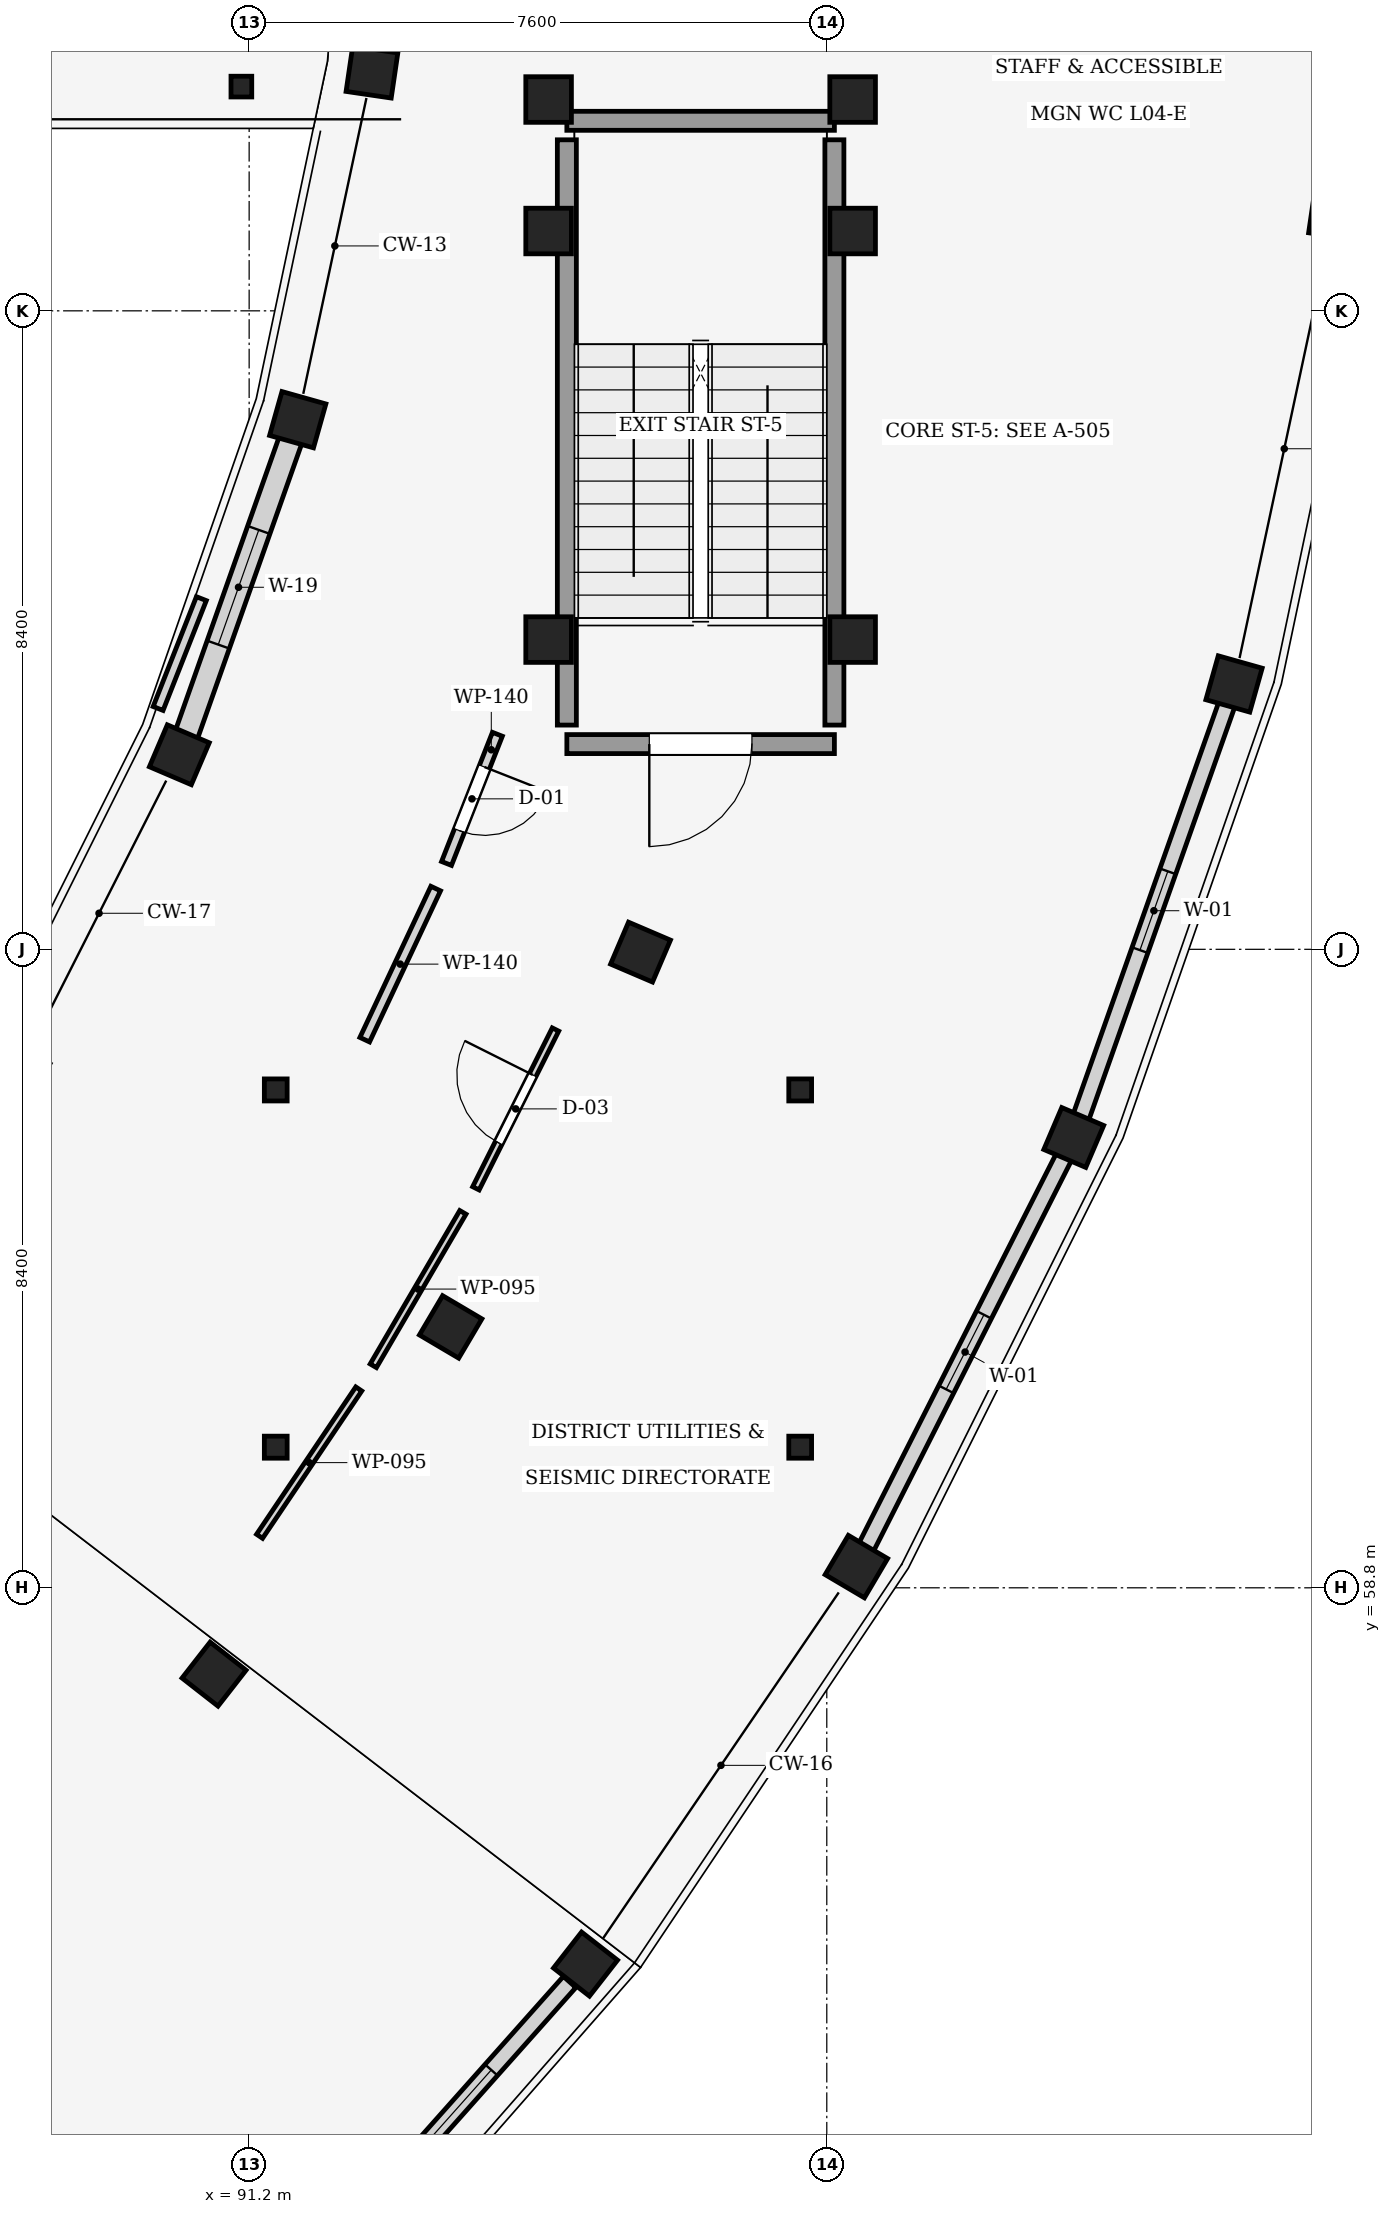
"""IFC4 building model, lengths in metres.
Left out: names, types, materials, properties, quantities, classifications, styles, units other than length and angle.
Written with IfcOpenShell. Run it as: python <this file> out.ifc"""

import sys

from ifc_helpers import new_model, si_unit, direction, frame, frame_2d, origin, origin_2d, place, context, subcontext, project, spatial, rectangle, hollow_circle, i_section, extrude, element, fill, save


model = new_model("IFC4")
c1 = context("Model", 3, precision=1e-05, world=origin(), true_north=direction((0.0, 1.0)))
c2 = subcontext(c1, "Body", "Model", "MODEL_VIEW")
j1 = project(units=[si_unit("LENGTHUNIT", "METRE"), si_unit("PLANEANGLEUNIT", "RADIAN")], contexts=[c1])
p1 = place(None, origin())
s1 = spatial("IfcSite", under=j1, at=p1, CompositionType="ELEMENT")
p2 = place(p1, origin())
s2 = spatial("IfcBuilding", under=s1, at=p2, CompositionType="ELEMENT")
p3 = place(p2, frame((0.0, 0.0, 17.25)))
s3 = spatial("IfcBuildingStorey", under=s2, at=p3, CompositionType="ELEMENT", Elevation=17.25)
for number, where, z_axis, x_axis in (
    (1, (90.738, 57.664, 0.0), (0.0, 0.0, 1.0), (0.788, -0.615, 0.0)),
    (2, (95.626, 53.849, 0.0), (0.0, 0.0, 1.0), (0.788, -0.615, 0.0)),
    (3, (93.851, 62.232, 0.0), (0.0, 0.0, 1.0), (0.861, -0.509, 0.0)),
    (4, (99.189, 59.079, 0.0), (0.0, 0.0, 1.0), (0.861, -0.509, 0.0)),
    (5, (90.281, 69.76, 0.0), (0.0, 0.0, 1.0), (0.919, -0.393, 0.0)),
    (6, (96.349, 67.163, 0.0), (0.0, 0.0, 1.0), (0.919, -0.393, 0.0)),
    (7, (102.049, 64.724, 0.0), (0.0, 0.0, 1.0), (0.919, -0.393, 0.0)),
    (8, (91.839, 74.168, 0.0), (0.0, 0.0, 1.0), (0.962, -0.272, 0.0)),
    (9, (104.158, 70.691, 0.0), (0.0, 0.0, 1.0), (0.962, -0.272, 0.0)),
    (10, (92.816, 78.74, 0.0), (0.0, 0.0, 1.0), (0.989, -0.145, 0.0)),
    (11, (105.48, 76.88, 0.0), (0.0, 0.0, 1.0), (0.989, -0.145, 0.0)),
):
    element("IfcColumn", number, at=place(p3, frame(where, z_axis=z_axis, x_axis=x_axis)), inside=s3, PredefinedType="COLUMN", context=c2, shape_type="SweptSolid", body=[
        extrude(rectangle(XDim=0.6, YDim=0.6, at=origin_2d()), origin(), (0.0, 0.0, 1.0), 4.05),
    ])
p4 = place(p3, frame((91.098, 78.55, 0.0), z_axis=(0.0, 0.0, 1.0), x_axis=(1.0, 0.0, 0.0)))
e12 = element("IfcColumn", 12, at=p4, inside=s3, PredefinedType="COLUMN", context=c2, shape_type="SweptSolid", body=[
    extrude(hollow_circle(Radius=0.136, WallThickness=0.016, at=origin_2d()), origin(), (0.0, 0.0, 1.0), 3.82),
])
for number, where, z_axis, x_axis in (
    (13, (99.14, 71.275, 0.0), (0.0, 0.0, 1.0), (1.0, 0.0, 0.0)),
    (14, (95.14, 71.275, 0.0), (0.0, 0.0, 1.0), (1.0, 0.0, 0.0)),
    (15, (99.14, 76.65, 0.0), (0.0, 0.0, 1.0), (1.0, 0.0, 0.0)),
    (16, (95.14, 76.65, 0.0), (0.0, 0.0, 1.0), (1.0, 0.0, 0.0)),
    (17, (99.14, 78.38, 0.0), (0.0, 0.0, 1.0), (1.0, 0.0, 0.0)),
    (18, (95.14, 78.38, 0.0), (0.0, 0.0, 1.0), (1.0, 0.0, 0.0)),
):
    element("IfcColumn", number, at=place(p3, frame(where, z_axis=z_axis, x_axis=x_axis)), inside=s3, PredefinedType="COLUMN", context=c2, shape_type="SweptSolid", body=[
        extrude(rectangle(XDim=0.6, YDim=0.6, at=origin_2d()), origin(), (0.0, 0.0, 1.0), 4.05),
    ])
for number, where, z_axis, x_axis in (
    (19, (91.55, 60.65, 0.0), (0.0, 0.0, 1.0), (1.0, 0.0, 0.0)),
    (20, (98.45, 60.65, 0.0), (0.0, 0.0, 1.0), (1.0, 0.0, 0.0)),
    (21, (98.45, 65.35, 0.0), (0.0, 0.0, 1.0), (1.0, 0.0, 0.0)),
    (22, (91.55, 65.35, 0.0), (0.0, 0.0, 1.0), (1.0, 0.0, 0.0)),
):
    element("IfcColumn", number, at=place(p3, frame(where, z_axis=z_axis, x_axis=x_axis)), inside=s3, PredefinedType="COLUMN", context=c2, shape_type="SweptSolid", body=[
        extrude(i_section(OverallWidth=0.3, OverallDepth=0.29, WebThickness=0.009, FlangeThickness=0.014, at=origin_2d()), origin(), (0.0, 0.0, 1.0), 4.05),
    ])
p5 = place(p3, frame((95.417, 53.615, 0.0), z_axis=(0.0, 0.0, 1.0), x_axis=(-0.6649220167, -0.746912787217, 0.0)))
e23 = element("IfcWall", 23, at=p5, inside=s3, PredefinedType="STANDARD", context=c2, shape_type="SweptSolid", body=[
    extrude(rectangle(XDim=5.699, YDim=0.22, at=frame_2d((2.85, 0.0))), origin(), (0.0, 0.0, 1.0), 2.935),
])
p6 = place(p5, frame((1.55, 0.0, 0.85)))
e24 = element("IfcOpeningElement", 24, at=p6, cuts=e23, PredefinedType="OPENING", context=c2, shape_type="SweptSolid", body=[
    extrude(rectangle(XDim=2.6, YDim=1.85, at=frame_2d((1.3, 0.925))), frame((0.0, 0.12, 0.0), z_axis=(0.0, -1.0, 0.0), x_axis=(1.0, 0.0, 0.0)), (0.0, 0.0, 1.0), 0.24),
])
p7 = place(p3, frame((101.93, 64.49, 0.0), z_axis=(0.0, 0.0, 1.0), x_axis=(-0.451920591159, -0.892058170349, 0.0)))
e25 = element("IfcWall", 25, at=p7, inside=s3, PredefinedType="STANDARD", context=c2, shape_type="SweptSolid", body=[
    extrude(rectangle(XDim=5.802, YDim=0.22, at=frame_2d((2.901, 0.0))), origin(), (0.0, 0.0, 1.0), 2.935),
])
p8 = place(p7, frame((2.351, 0.0, 0.85)))
e26 = element("IfcOpeningElement", 26, at=p8, cuts=e25, PredefinedType="OPENING", context=c2, shape_type="SweptSolid", body=[
    extrude(rectangle(XDim=1.1, YDim=1.35, at=frame_2d((0.55, 0.675))), frame((0.0, 0.12, 0.0), z_axis=(0.0, -1.0, 0.0), x_axis=(1.0, 0.0, 0.0)), (0.0, 0.0, 1.0), 0.24),
])
p9 = place(p3, frame((104.075, 70.456, 0.0), z_axis=(0.0, 0.0, 1.0), x_axis=(-0.333212182882, -0.942851865978, 0.0)))
e27 = element("IfcWall", 27, at=p9, inside=s3, PredefinedType="STANDARD", context=c2, shape_type="SweptSolid", body=[
    extrude(rectangle(XDim=5.83, YDim=0.22, at=frame_2d((2.915, 0.0))), origin(), (0.0, 0.0, 1.0), 2.935),
])
p10 = place(p9, frame((2.365, 0.0, 0.85)))
e28 = element("IfcOpeningElement", 28, at=p10, cuts=e27, PredefinedType="OPENING", context=c2, shape_type="SweptSolid", body=[
    extrude(rectangle(XDim=1.1, YDim=1.35, at=frame_2d((0.55, 0.675))), frame((0.0, 0.12, 0.0), z_axis=(0.0, -1.0, 0.0), x_axis=(1.0, 0.0, 0.0)), (0.0, 0.0, 1.0), 0.24),
])
p11 = place(p3, frame((90.365, 69.995, 0.0), z_axis=(0.0, 0.0, 1.0), x_axis=(0.333168640656, 0.942867253055, 0.0)))
e29 = element("IfcWall", 29, at=p11, inside=s3, PredefinedType="STANDARD", context=c2, shape_type="SweptSolid", body=[
    extrude(rectangle(XDim=4.177, YDim=0.31, at=frame_2d((2.088, 0.0))), origin(), (0.0, 0.0, 1.0), 3.085),
])
p12 = place(p11, frame((1.288, 0.0, 0.85)))
e30 = element("IfcOpeningElement", 30, at=p12, cuts=e29, PredefinedType="OPENING", context=c2, shape_type="SweptSolid", body=[
    extrude(rectangle(XDim=1.6, YDim=1.65, at=frame_2d((0.8, 0.825))), frame((0.0, 0.165, 0.0), z_axis=(0.0, -1.0, 0.0), x_axis=(1.0, 0.0, 0.0)), (0.0, 0.0, 1.0), 0.33),
])
p13 = place(p3, frame((92.835, 78.975, 0.0), z_axis=(0.0, 0.0, 1.0), x_axis=(0.081074723481, 0.99670802606, 0.0)))
e31 = element("IfcWall", 31, at=p13, inside=s3, PredefinedType="STANDARD", context=c2, shape_type="SweptSolid", body=[
    extrude(rectangle(XDim=4.204, YDim=0.31, at=frame_2d((2.102, 0.0))), origin(), (0.0, 0.0, 1.0), 2.935),
])
p14 = place(p13, frame((1.052, 0.0, 0.85)))
e32 = element("IfcOpeningElement", 32, at=p14, cuts=e31, PredefinedType="OPENING", context=c2, shape_type="SweptSolid", body=[
    extrude(rectangle(XDim=2.1, YDim=1.65, at=frame_2d((1.05, 0.825))), frame((0.0, 0.165, 0.0), z_axis=(0.0, -1.0, 0.0), x_axis=(1.0, 0.0, 0.0)), (0.0, 0.0, 1.0), 0.33),
])
p15 = place(p3, frame((98.9, 69.9, 0.0), z_axis=(0.0, 0.0, 1.0), x_axis=(-1.0, 0.0, 0.0)))
e33 = element("IfcWall", 33, at=p15, inside=s3, PredefinedType="SHEAR", context=c2, shape_type="SweptSolid", body=[
    extrude(rectangle(XDim=3.52, YDim=0.25, at=frame_2d((1.76, 0.0))), origin(), (0.0, 0.0, 1.0), 4.05),
])
p16 = place(p15, frame((1.085, 0.0, 0.0)))
e34 = element("IfcOpeningElement", 34, at=p16, cuts=e33, PredefinedType="OPENING", context=c2, shape_type="SweptSolid", body=[
    extrude(rectangle(XDim=1.35, YDim=2.2, at=frame_2d((0.675, 1.1))), frame((0.0, 0.135, 0.0), z_axis=(0.0, -1.0, 0.0), x_axis=(1.0, 0.0, 0.0)), (0.0, 0.0, 1.0), 0.27),
])
p17 = place(p3, frame((95.38, 70.15, 0.0), z_axis=(0.0, 0.0, 1.0), x_axis=(0.0, 1.0, 0.0)))
e35 = element("IfcWall", 35, at=p17, inside=s3, PredefinedType="SHEAR", context=c2, shape_type="SweptSolid", body=[
    extrude(rectangle(XDim=7.7, YDim=0.25, at=frame_2d((3.85, 0.0))), origin(), (0.0, 0.0, 1.0), 4.05),
])
p18 = place(p3, frame((95.38, 78.1, 0.0), z_axis=(0.0, 0.0, 1.0), x_axis=(1.0, 0.0, 0.0)))
e36 = element("IfcWall", 36, at=p18, inside=s3, PredefinedType="SHEAR", context=c2, shape_type="SweptSolid", body=[
    extrude(rectangle(XDim=3.52, YDim=0.25, at=frame_2d((1.76, 0.0))), origin(), (0.0, 0.0, 1.0), 4.05),
])
p19 = place(p3, frame((98.9, 77.85, 0.0), z_axis=(0.0, 0.0, 1.0), x_axis=(0.0, -1.0, 0.0)))
e37 = element("IfcWall", 37, at=p19, inside=s3, PredefinedType="SHEAR", context=c2, shape_type="SweptSolid", body=[
    extrude(rectangle(XDim=7.7, YDim=0.25, at=frame_2d((3.85, 0.0))), origin(), (0.0, 0.0, 1.0), 4.05),
])
p20 = place(p3, frame((92.833, 61.721, 0.0), z_axis=(0.0, 0.0, 1.0), x_axis=(0.504228203008, 0.863570448366, 0.0)))
e38 = element("IfcWall", 38, at=p20, inside=s3, PredefinedType="PARTITIONING", context=c2, shape_type="SweptSolid", body=[
    extrude(rectangle(XDim=2.337, YDim=0.095, at=frame_2d((1.168, 0.0))), origin(), (0.0, 0.0, 1.0), 2.935),
])
p21 = place(p3, frame((94.184, 64.056, 0.0), z_axis=(0.0, 0.0, 1.0), x_axis=(0.448049117921, 0.894008941751, 0.0)))
e39 = element("IfcWall", 39, at=p21, inside=s3, PredefinedType="PARTITIONING", context=c2, shape_type="SweptSolid", body=[
    extrude(rectangle(XDim=2.337, YDim=0.095, at=frame_2d((1.168, 0.0))), origin(), (0.0, 0.0, 1.0), 3.62),
])
p22 = place(p21, frame((0.669, 0.0, 0.0)))
e40 = element("IfcOpeningElement", 40, at=p22, cuts=e39, PredefinedType="OPENING", context=c2, shape_type="SweptSolid", body=[
    extrude(rectangle(XDim=1.0, YDim=2.1, at=frame_2d((0.5, 1.05))), frame((0.0, 0.057, 0.0), z_axis=(0.0, -1.0, 0.0), x_axis=(1.0, 0.0, 0.0)), (0.0, 0.0, 1.0), 0.115),
])
p23 = place(p3, frame((91.337, 59.478, 0.0), z_axis=(0.0, 0.0, 1.0), x_axis=(0.558383281721, 0.829583094508, 0.0)))
e41 = element("IfcWall", 41, at=p23, inside=s3, PredefinedType="PARTITIONING", context=c2, shape_type="SweptSolid", body=[
    extrude(rectangle(XDim=2.337, YDim=0.095, at=frame_2d((1.168, 0.0))), origin(), (0.0, 0.0, 1.0), 3.62),
])
p24 = place(p3, frame((94.466, 70.029, 0.0), z_axis=(0.0, 0.0, 1.0), x_axis=(-0.366384258343, -0.93046363456, 0.0)))
e42 = element("IfcWall", 42, at=p24, inside=s3, PredefinedType="PARTITIONING", context=c2, shape_type="SweptSolid", body=[
    extrude(rectangle(XDim=1.826, YDim=0.14, at=frame_2d((0.913, 0.0))), origin(), (0.0, 0.0, 1.0), 3.62),
])
p25 = place(p24, frame((0.463, 0.0, 0.0)))
e43 = element("IfcOpeningElement", 43, at=p25, cuts=e42, PredefinedType="OPENING", context=c2, shape_type="SweptSolid", body=[
    extrude(rectangle(XDim=0.9, YDim=2.1, at=frame_2d((0.45, 1.05))), frame((0.0, 0.08, 0.0), z_axis=(0.0, -1.0, 0.0), x_axis=(1.0, 0.0, 0.0)), (0.0, 0.0, 1.0), 0.16),
])
p26 = place(p3, frame((93.654, 67.999, 0.0), z_axis=(0.0, 0.0, 1.0), x_axis=(-0.425026094766, -0.905181097222, 0.0)))
e44 = element("IfcWall", 44, at=p26, inside=s3, PredefinedType="PARTITIONING", context=c2, shape_type="SweptSolid", body=[
    extrude(rectangle(XDim=2.197, YDim=0.14, at=frame_2d((1.098, 0.0))), origin(), (0.0, 0.0, 1.0), 3.62),
])
p27 = place(p3, frame((90.002, 70.368, 0.0), z_axis=(0.0, 0.0, 1.0), x_axis=(0.366425549854, 0.930447374339, 0.0)))
e45 = element("IfcWall", 45, at=p27, inside=s3, PredefinedType="PARTITIONING", context=c2, shape_type="SweptSolid", body=[
    extrude(rectangle(XDim=1.553, YDim=0.14, at=frame_2d((0.776, 0.0))), origin(), (0.0, 0.0, 1.0), 3.085),
])
p28 = place(p6, origin())
e46 = element("IfcWindow", 46, at=p28, inside=s3, PartitioningType="SINGLE_PANEL", PredefinedType="WINDOW", context=c2, shape_type="SweptSolid", body=[
    extrude(rectangle(XDim=2.6, YDim=1.85, at=frame_2d((1.3, 0.925))), frame((0.0, 0.03, 0.0), z_axis=(0.0, -1.0, 0.0), x_axis=(1.0, 0.0, 0.0)), (0.0, 0.0, 1.0), 0.06),
])
fill(e24, e46)
p29 = place(p8, origin())
e47 = element("IfcWindow", 47, at=p29, inside=s3, PartitioningType="SINGLE_PANEL", PredefinedType="WINDOW", context=c2, shape_type="SweptSolid", body=[
    extrude(rectangle(XDim=1.1, YDim=1.35, at=frame_2d((0.55, 0.675))), frame((0.0, 0.03, 0.0), z_axis=(0.0, -1.0, 0.0), x_axis=(1.0, 0.0, 0.0)), (0.0, 0.0, 1.0), 0.06),
])
fill(e26, e47)
p30 = place(p10, origin())
e48 = element("IfcWindow", 48, at=p30, inside=s3, PartitioningType="SINGLE_PANEL", PredefinedType="WINDOW", context=c2, shape_type="SweptSolid", body=[
    extrude(rectangle(XDim=1.1, YDim=1.35, at=frame_2d((0.55, 0.675))), frame((0.0, 0.03, 0.0), z_axis=(0.0, -1.0, 0.0), x_axis=(1.0, 0.0, 0.0)), (0.0, 0.0, 1.0), 0.06),
])
fill(e28, e48)
p31 = place(p12, origin())
e49 = element("IfcWindow", 49, at=p31, inside=s3, PartitioningType="SINGLE_PANEL", PredefinedType="WINDOW", context=c2, shape_type="SweptSolid", body=[
    extrude(rectangle(XDim=1.6, YDim=1.65, at=frame_2d((0.8, 0.825))), frame((0.0, 0.03, 0.0), z_axis=(0.0, -1.0, 0.0), x_axis=(1.0, 0.0, 0.0)), (0.0, 0.0, 1.0), 0.06),
])
fill(e30, e49)
p32 = place(p16, origin())
e50 = element("IfcDoor", 50, at=p32, inside=s3, OperationType="SINGLE_SWING_RIGHT", PredefinedType="DOOR", context=c2, shape_type="SweptSolid", body=[
    extrude(rectangle(XDim=1.35, YDim=2.2, at=frame_2d((0.675, 1.1))), frame((0.0, 0.025, 0.0), z_axis=(0.0, -1.0, 0.0), x_axis=(1.0, 0.0, 0.0)), (0.0, 0.0, 1.0), 0.05),
])
fill(e34, e50)
p33 = place(p22, origin())
e51 = element("IfcDoor", 51, at=p33, inside=s3, OperationType="SINGLE_SWING_RIGHT", PredefinedType="DOOR", context=c2, shape_type="SweptSolid", body=[
    extrude(rectangle(XDim=1.0, YDim=2.1, at=frame_2d((0.5, 1.05))), frame((0.0, 0.025, 0.0), z_axis=(0.0, -1.0, 0.0), x_axis=(1.0, 0.0, 0.0)), (0.0, 0.0, 1.0), 0.05),
])
fill(e40, e51)
p34 = place(p25, origin())
e52 = element("IfcDoor", 52, at=p34, inside=s3, OperationType="SINGLE_SWING_LEFT", PredefinedType="DOOR", context=c2, shape_type="SweptSolid", body=[
    extrude(rectangle(XDim=0.9, YDim=2.1, at=frame_2d((0.45, 1.05))), frame((0.0, 0.025, 0.0), z_axis=(0.0, -1.0, 0.0), x_axis=(1.0, 0.0, 0.0)), (0.0, 0.0, 1.0), 0.05),
])
fill(e43, e52)
save(model, sys.argv[1])
